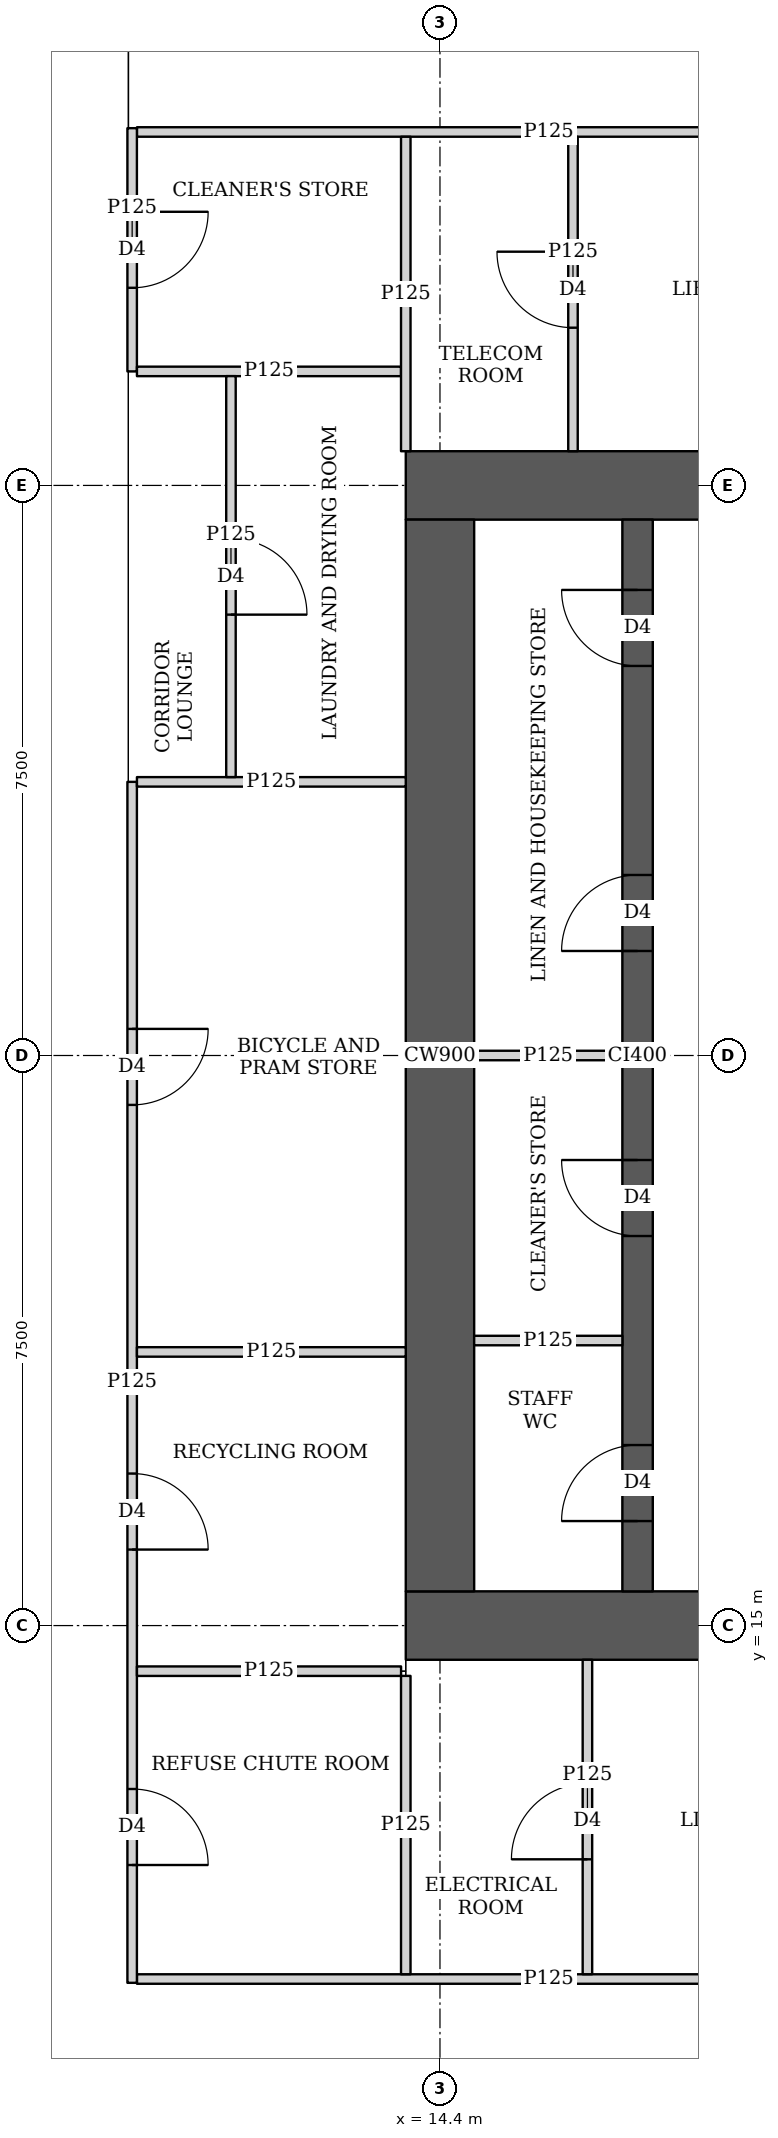
"""IFC4 building model, lengths in metres.
Left out: names, types, materials, properties, quantities, classifications, styles, units other than length and angle.
Written with IfcOpenShell. Run it as: python <this file> out.ifc"""

import sys

from ifc_helpers import new_model, si_unit, direction, frame, frame_2d, origin, place, context, subcontext, project, spatial, rectangle, extrude, element, fill, save


model = new_model("IFC4")
c1 = context("Model", 3, precision=1e-05, world=origin(), true_north=direction((0.0, 1.0)))
c2 = subcontext(c1, "Body", "Model", "MODEL_VIEW")
j1 = project(units=[si_unit("LENGTHUNIT", "METRE"), si_unit("PLANEANGLEUNIT", "RADIAN")], contexts=[c1])
p1 = place(None, origin())
s1 = spatial("IfcSite", under=j1, at=p1, CompositionType="ELEMENT")
p2 = place(p1, origin())
s2 = spatial("IfcBuilding", under=s1, at=p2, CompositionType="ELEMENT")
p3 = place(p2, frame((0.0, 0.0, 135.8)))
s3 = spatial("IfcBuildingStorey", under=s2, at=p3, CompositionType="ELEMENT", Elevation=135.8)
p4 = place(p3, frame((13.95, 15.0, 0.0), z_axis=(0.0, 0.0, 1.0), x_axis=(1.0, 0.0, 0.0)))
e1 = element("IfcWall", 1, at=p4, inside=s3, PredefinedType="SHEAR", context=c2, shape_type="SweptSolid", body=[
    extrude(rectangle(XDim=15.3, YDim=0.9, at=frame_2d((7.65, 0.0))), origin(), (0.0, 0.0, 1.0), 3.75),
])
p5 = place(p4, frame((4.45, 0.0, 0.0)))
e2 = element("IfcOpeningElement", 2, at=p5, cuts=e1, PredefinedType="OPENING", context=c2, shape_type="SweptSolid", body=[
    extrude(rectangle(XDim=1.8, YDim=2.1, at=frame_2d((0.9, 1.05))), frame((0.0, 0.46, 0.0), z_axis=(0.0, -1.0, 0.0), x_axis=(1.0, 0.0, 0.0)), (0.0, 0.0, 1.0), 0.92),
])
p6 = place(p4, frame((10.7, 0.0, 0.0)))
e3 = element("IfcOpeningElement", 3, at=p6, cuts=e1, PredefinedType="OPENING", context=c2, shape_type="SweptSolid", body=[
    extrude(rectangle(XDim=1.1, YDim=2.1, at=frame_2d((0.55, 1.05))), frame((0.0, 0.46, 0.0), z_axis=(0.0, -1.0, 0.0), x_axis=(1.0, 0.0, 0.0)), (0.0, 0.0, 1.0), 0.92),
])
p7 = place(p3, frame((13.95, 30.0, 0.0), z_axis=(0.0, 0.0, 1.0), x_axis=(1.0, 0.0, 0.0)))
e4 = element("IfcWall", 4, at=p7, inside=s3, PredefinedType="SHEAR", context=c2, shape_type="SweptSolid", body=[
    extrude(rectangle(XDim=15.3, YDim=0.9, at=frame_2d((7.65, 0.0))), origin(), (0.0, 0.0, 1.0), 3.75),
])
p8 = place(p7, frame((4.45, 0.0, 0.0)))
e5 = element("IfcOpeningElement", 5, at=p8, cuts=e4, PredefinedType="OPENING", context=c2, shape_type="SweptSolid", body=[
    extrude(rectangle(XDim=1.8, YDim=2.1, at=frame_2d((0.9, 1.05))), frame((0.0, 0.46, 0.0), z_axis=(0.0, -1.0, 0.0), x_axis=(1.0, 0.0, 0.0)), (0.0, 0.0, 1.0), 0.92),
])
p9 = place(p7, frame((10.7, 0.0, 0.0)))
e6 = element("IfcOpeningElement", 6, at=p9, cuts=e4, PredefinedType="OPENING", context=c2, shape_type="SweptSolid", body=[
    extrude(rectangle(XDim=1.1, YDim=2.1, at=frame_2d((0.55, 1.05))), frame((0.0, 0.46, 0.0), z_axis=(0.0, -1.0, 0.0), x_axis=(1.0, 0.0, 0.0)), (0.0, 0.0, 1.0), 0.92),
])
p10 = place(p3, frame((14.4, 15.45, 0.0), z_axis=(0.0, 0.0, 1.0), x_axis=(0.0, 1.0, 0.0)))
e7 = element("IfcWall", 7, at=p10, inside=s3, PredefinedType="SHEAR", context=c2, shape_type="SweptSolid", body=[
    extrude(rectangle(XDim=14.1, YDim=0.9, at=frame_2d((7.05, 0.0))), origin(), (0.0, 0.0, 1.0), 3.75),
])
p11 = place(p3, frame((17.0, 15.45, 0.0), z_axis=(0.0, 0.0, 1.0), x_axis=(0.0, 1.0, 0.0)))
e8 = element("IfcWall", 8, at=p11, inside=s3, PredefinedType="SHEAR", context=c2, shape_type="SweptSolid", body=[
    extrude(rectangle(XDim=14.1, YDim=0.4, at=frame_2d((7.05, 0.0))), origin(), (0.0, 0.0, 1.0), 3.75),
])
p12 = place(p11, frame((0.925, 0.0, 0.0)))
e9 = element("IfcOpeningElement", 9, at=p12, cuts=e8, PredefinedType="OPENING", context=c2, shape_type="SweptSolid", body=[
    extrude(rectangle(XDim=1.0, YDim=2.1, at=frame_2d((0.5, 1.05))), frame((0.0, 0.21, 0.0), z_axis=(0.0, -1.0, 0.0), x_axis=(1.0, 0.0, 0.0)), (0.0, 0.0, 1.0), 0.42),
])
p13 = place(p11, frame((4.675, 0.0, 0.0)))
e10 = element("IfcOpeningElement", 10, at=p13, cuts=e8, PredefinedType="OPENING", context=c2, shape_type="SweptSolid", body=[
    extrude(rectangle(XDim=1.0, YDim=2.1, at=frame_2d((0.5, 1.05))), frame((0.0, 0.21, 0.0), z_axis=(0.0, -1.0, 0.0), x_axis=(1.0, 0.0, 0.0)), (0.0, 0.0, 1.0), 0.42),
])
p14 = place(p11, frame((8.425, 0.0, 0.0)))
e11 = element("IfcOpeningElement", 11, at=p14, cuts=e8, PredefinedType="OPENING", context=c2, shape_type="SweptSolid", body=[
    extrude(rectangle(XDim=1.0, YDim=2.1, at=frame_2d((0.5, 1.05))), frame((0.0, 0.21, 0.0), z_axis=(0.0, -1.0, 0.0), x_axis=(1.0, 0.0, 0.0)), (0.0, 0.0, 1.0), 0.42),
])
p15 = place(p11, frame((12.175, 0.0, 0.0)))
e12 = element("IfcOpeningElement", 12, at=p15, cuts=e8, PredefinedType="OPENING", context=c2, shape_type="SweptSolid", body=[
    extrude(rectangle(XDim=1.0, YDim=2.1, at=frame_2d((0.5, 1.05))), frame((0.0, 0.21, 0.0), z_axis=(0.0, -1.0, 0.0), x_axis=(1.0, 0.0, 0.0)), (0.0, 0.0, 1.0), 0.42),
])
p16 = place(p3, frame((10.35, 10.3, 0.0), z_axis=(0.0, 0.0, 1.0), x_axis=(0.0, 1.0, 0.0)))
e13 = element("IfcWall", 13, at=p16, inside=s3, PredefinedType="PARTITIONING", context=c2, shape_type="SweptSolid", body=[
    extrude(rectangle(XDim=15.8, YDim=0.125, at=frame_2d((7.9, 0.0))), origin(), (0.0, 0.0, 1.0), 3.5),
])
p17 = place(p16, frame((1.55, 0.0, 0.0)))
e14 = element("IfcOpeningElement", 14, at=p17, cuts=e13, PredefinedType="OPENING", context=c2, shape_type="SweptSolid", body=[
    extrude(rectangle(XDim=1.0, YDim=2.1, at=frame_2d((0.5, 1.05))), frame((0.0, 0.073, 0.0), z_axis=(0.0, -1.0, 0.0), x_axis=(1.0, 0.0, 0.0)), (0.0, 0.0, 1.0), 0.145),
])
p18 = place(p16, frame((5.7, 0.0, 0.0)))
e15 = element("IfcOpeningElement", 15, at=p18, cuts=e13, PredefinedType="OPENING", context=c2, shape_type="SweptSolid", body=[
    extrude(rectangle(XDim=1.0, YDim=2.1, at=frame_2d((0.5, 1.05))), frame((0.0, 0.073, 0.0), z_axis=(0.0, -1.0, 0.0), x_axis=(1.0, 0.0, 0.0)), (0.0, 0.0, 1.0), 0.145),
])
p19 = place(p16, frame((11.55, 0.0, 0.0)))
e16 = element("IfcOpeningElement", 16, at=p19, cuts=e13, PredefinedType="OPENING", context=c2, shape_type="SweptSolid", body=[
    extrude(rectangle(XDim=1.0, YDim=2.1, at=frame_2d((0.5, 1.05))), frame((0.0, 0.073, 0.0), z_axis=(0.0, -1.0, 0.0), x_axis=(1.0, 0.0, 0.0)), (0.0, 0.0, 1.0), 0.145),
])
p20 = place(p3, frame((10.35, 31.5, 0.0), z_axis=(0.0, 0.0, 1.0), x_axis=(0.0, 1.0, 0.0)))
e17 = element("IfcWall", 17, at=p20, inside=s3, PredefinedType="PARTITIONING", context=c2, shape_type="SweptSolid", body=[
    extrude(rectangle(XDim=3.2, YDim=0.125, at=frame_2d((1.6, 0.0))), origin(), (0.0, 0.0, 1.0), 3.5),
])
p21 = place(p20, frame((1.1, 0.0, 0.0)))
e18 = element("IfcOpeningElement", 18, at=p21, cuts=e17, PredefinedType="OPENING", context=c2, shape_type="SweptSolid", body=[
    extrude(rectangle(XDim=1.0, YDim=2.1, at=frame_2d((0.5, 1.05))), frame((0.0, 0.073, 0.0), z_axis=(0.0, -1.0, 0.0), x_axis=(1.0, 0.0, 0.0)), (0.0, 0.0, 1.0), 0.145),
])
p22 = place(p3, frame((11.65, 26.163, 0.0), z_axis=(0.0, 0.0, 1.0), x_axis=(0.0, 1.0, 0.0)))
e19 = element("IfcWall", 19, at=p22, inside=s3, PredefinedType="PARTITIONING", context=c2, shape_type="SweptSolid", body=[
    extrude(rectangle(XDim=5.275, YDim=0.125, at=frame_2d((2.637, 0.0))), origin(), (0.0, 0.0, 1.0), 3.5),
])
p23 = place(p22, frame((2.137, 0.0, 0.0)))
e20 = element("IfcOpeningElement", 20, at=p23, cuts=e19, PredefinedType="OPENING", context=c2, shape_type="SweptSolid", body=[
    extrude(rectangle(XDim=1.0, YDim=2.1, at=frame_2d((0.5, 1.05))), frame((0.0, 0.073, 0.0), z_axis=(0.0, -1.0, 0.0), x_axis=(1.0, 0.0, 0.0)), (0.0, 0.0, 1.0), 0.145),
])
p24 = place(p3, frame((10.413, 14.4, 0.0), z_axis=(0.0, 0.0, 1.0), x_axis=(1.0, 0.0, 0.0)))
e21 = element("IfcWall", 21, at=p24, inside=s3, PredefinedType="PARTITIONING", context=c2, shape_type="SweptSolid", body=[
    extrude(rectangle(XDim=3.475, YDim=0.125, at=frame_2d((1.737, 0.0))), origin(), (0.0, 0.0, 1.0), 3.5),
])
for number, where, z_axis, x_axis in (
    (22, (10.413, 18.6, 0.0), (0.0, 0.0, 1.0), (1.0, 0.0, 0.0)),
    (23, (10.413, 26.1, 0.0), (0.0, 0.0, 1.0), (1.0, 0.0, 0.0)),
):
    element("IfcWall", number, at=place(p3, frame(where, z_axis=z_axis, x_axis=x_axis)), inside=s3, PredefinedType="PARTITIONING", context=c2, shape_type="SweptSolid", body=[
        extrude(rectangle(XDim=3.537, YDim=0.125, at=frame_2d((1.769, 0.0))), origin(), (0.0, 0.0, 1.0), 3.5),
    ])
p25 = place(p3, frame((10.413, 31.5, 0.0), z_axis=(0.0, 0.0, 1.0), x_axis=(1.0, 0.0, 0.0)))
e24 = element("IfcWall", 24, at=p25, inside=s3, PredefinedType="PARTITIONING", context=c2, shape_type="SweptSolid", body=[
    extrude(rectangle(XDim=3.475, YDim=0.125, at=frame_2d((1.737, 0.0))), origin(), (0.0, 0.0, 1.0), 3.5),
])
p26 = place(p3, frame((13.95, 10.413, 0.0), z_axis=(0.0, 0.0, 1.0), x_axis=(0.0, 1.0, 0.0)))
e25 = element("IfcWall", 25, at=p26, inside=s3, PredefinedType="PARTITIONING", context=c2, shape_type="SweptSolid", body=[
    extrude(rectangle(XDim=3.925, YDim=0.125, at=frame_2d((1.962, 0.0))), origin(), (0.0, 0.0, 1.0), 3.5),
])
p27 = place(p3, frame((13.95, 30.45, 0.0), z_axis=(0.0, 0.0, 1.0), x_axis=(0.0, 1.0, 0.0)))
e26 = element("IfcWall", 26, at=p27, inside=s3, PredefinedType="PARTITIONING", context=c2, shape_type="SweptSolid", body=[
    extrude(rectangle(XDim=4.137, YDim=0.125, at=frame_2d((2.068, 0.0))), origin(), (0.0, 0.0, 1.0), 3.5),
])
p28 = place(p3, frame((10.413, 10.35, 0.0), z_axis=(0.0, 0.0, 1.0), x_axis=(1.0, 0.0, 0.0)))
e27 = element("IfcWall", 27, at=p28, inside=s3, PredefinedType="PARTITIONING", context=c2, shape_type="SweptSolid", body=[
    extrude(rectangle(XDim=10.837, YDim=0.125, at=frame_2d((5.418, 0.0))), origin(), (0.0, 0.0, 1.0), 3.5),
])
p29 = place(p28, frame((7.582, 0.0, 0.0)))
e28 = element("IfcOpeningElement", 28, at=p29, cuts=e27, PredefinedType="OPENING", context=c2, shape_type="SweptSolid", body=[
    extrude(rectangle(XDim=1.8, YDim=2.1, at=frame_2d((0.9, 1.05))), frame((0.0, 0.073, 0.0), z_axis=(0.0, -1.0, 0.0), x_axis=(1.0, 0.0, 0.0)), (0.0, 0.0, 1.0), 0.145),
])
p30 = place(p3, frame((10.413, 34.65, 0.0), z_axis=(0.0, 0.0, 1.0), x_axis=(1.0, 0.0, 0.0)))
e29 = element("IfcWall", 29, at=p30, inside=s3, PredefinedType="PARTITIONING", context=c2, shape_type="SweptSolid", body=[
    extrude(rectangle(XDim=10.837, YDim=0.125, at=frame_2d((5.418, 0.0))), origin(), (0.0, 0.0, 1.0), 3.5),
])
p31 = place(p30, frame((7.487, 0.0, 0.0)))
e30 = element("IfcOpeningElement", 30, at=p31, cuts=e29, PredefinedType="OPENING", context=c2, shape_type="SweptSolid", body=[
    extrude(rectangle(XDim=1.8, YDim=2.1, at=frame_2d((0.9, 1.05))), frame((0.0, 0.073, 0.0), z_axis=(0.0, -1.0, 0.0), x_axis=(1.0, 0.0, 0.0)), (0.0, 0.0, 1.0), 0.145),
])
p32 = place(p3, frame((16.34, 10.413, 0.0), z_axis=(0.0, 0.0, 1.0), x_axis=(0.0, 1.0, 0.0)))
e31 = element("IfcWall", 31, at=p32, inside=s3, PredefinedType="PARTITIONING", context=c2, shape_type="SweptSolid", body=[
    extrude(rectangle(XDim=4.137, YDim=0.125, at=frame_2d((2.068, 0.0))), origin(), (0.0, 0.0, 1.0), 3.5),
])
p33 = place(p32, frame((1.512, 0.0, 0.0)))
e32 = element("IfcOpeningElement", 32, at=p33, cuts=e31, PredefinedType="OPENING", context=c2, shape_type="SweptSolid", body=[
    extrude(rectangle(XDim=1.0, YDim=2.1, at=frame_2d((0.5, 1.05))), frame((0.0, 0.073, 0.0), z_axis=(0.0, -1.0, 0.0), x_axis=(1.0, 0.0, 0.0)), (0.0, 0.0, 1.0), 0.145),
])
p34 = place(p3, frame((16.15, 30.45, 0.0), z_axis=(0.0, 0.0, 1.0), x_axis=(0.0, 1.0, 0.0)))
e33 = element("IfcWall", 33, at=p34, inside=s3, PredefinedType="PARTITIONING", context=c2, shape_type="SweptSolid", body=[
    extrude(rectangle(XDim=4.137, YDim=0.125, at=frame_2d((2.068, 0.0))), origin(), (0.0, 0.0, 1.0), 3.5),
])
p35 = place(p34, frame((1.625, 0.0, 0.0)))
e34 = element("IfcOpeningElement", 34, at=p35, cuts=e33, PredefinedType="OPENING", context=c2, shape_type="SweptSolid", body=[
    extrude(rectangle(XDim=1.0, YDim=2.1, at=frame_2d((0.5, 1.05))), frame((0.0, 0.073, 0.0), z_axis=(0.0, -1.0, 0.0), x_axis=(1.0, 0.0, 0.0)), (0.0, 0.0, 1.0), 0.145),
])
for number, where, z_axis, x_axis in (
    (35, (14.85, 18.75, 0.0), (0.0, 0.0, 1.0), (1.0, 0.0, 0.0)),
    (36, (14.85, 22.5, 0.0), (0.0, 0.0, 1.0), (1.0, 0.0, 0.0)),
):
    element("IfcWall", number, at=place(p3, frame(where, z_axis=z_axis, x_axis=x_axis)), inside=s3, PredefinedType="PARTITIONING", context=c2, shape_type="SweptSolid", body=[
        extrude(rectangle(XDim=1.95, YDim=0.125, at=frame_2d((0.975, 0.0))), origin(), (0.0, 0.0, 1.0), 3.5),
    ])
p36 = place(p17, origin())
e37 = element("IfcDoor", 37, at=p36, inside=s3, OperationType="SINGLE_SWING_RIGHT", PredefinedType="DOOR", context=c2, shape_type="SweptSolid", body=[
    extrude(rectangle(XDim=1.0, YDim=2.1, at=frame_2d((0.5, 1.05))), frame((0.0, 0.025, 0.0), z_axis=(0.0, -1.0, 0.0), x_axis=(1.0, 0.0, 0.0)), (0.0, 0.0, 1.0), 0.05),
])
fill(e14, e37)
p37 = place(p18, origin())
e38 = element("IfcDoor", 38, at=p37, inside=s3, OperationType="SINGLE_SWING_RIGHT", PredefinedType="DOOR", context=c2, shape_type="SweptSolid", body=[
    extrude(rectangle(XDim=1.0, YDim=2.1, at=frame_2d((0.5, 1.05))), frame((0.0, 0.025, 0.0), z_axis=(0.0, -1.0, 0.0), x_axis=(1.0, 0.0, 0.0)), (0.0, 0.0, 1.0), 0.05),
])
fill(e15, e38)
p38 = place(p19, origin())
e39 = element("IfcDoor", 39, at=p38, inside=s3, OperationType="SINGLE_SWING_LEFT", PredefinedType="DOOR", context=c2, shape_type="SweptSolid", body=[
    extrude(rectangle(XDim=1.0, YDim=2.1, at=frame_2d((0.5, 1.05))), frame((0.0, 0.025, 0.0), z_axis=(0.0, -1.0, 0.0), x_axis=(1.0, 0.0, 0.0)), (0.0, 0.0, 1.0), 0.05),
])
fill(e16, e39)
p39 = place(p23, origin())
e40 = element("IfcDoor", 40, at=p39, inside=s3, OperationType="SINGLE_SWING_RIGHT", PredefinedType="DOOR", context=c2, shape_type="SweptSolid", body=[
    extrude(rectangle(XDim=1.0, YDim=2.1, at=frame_2d((0.5, 1.05))), frame((0.0, 0.025, 0.0), z_axis=(0.0, -1.0, 0.0), x_axis=(1.0, 0.0, 0.0)), (0.0, 0.0, 1.0), 0.05),
])
fill(e20, e40)
p40 = place(p21, origin())
e41 = element("IfcDoor", 41, at=p40, inside=s3, OperationType="SINGLE_SWING_LEFT", PredefinedType="DOOR", context=c2, shape_type="SweptSolid", body=[
    extrude(rectangle(XDim=1.0, YDim=2.1, at=frame_2d((0.5, 1.05))), frame((0.0, 0.025, 0.0), z_axis=(0.0, -1.0, 0.0), x_axis=(1.0, 0.0, 0.0)), (0.0, 0.0, 1.0), 0.05),
])
fill(e18, e41)
p41 = place(p33, origin())
e42 = element("IfcDoor", 42, at=p41, inside=s3, OperationType="SINGLE_SWING_LEFT", PredefinedType="DOOR", context=c2, shape_type="SweptSolid", body=[
    extrude(rectangle(XDim=1.0, YDim=2.1, at=frame_2d((0.5, 1.05))), frame((0.0, 0.025, 0.0), z_axis=(0.0, -1.0, 0.0), x_axis=(1.0, 0.0, 0.0)), (0.0, 0.0, 1.0), 0.05),
])
fill(e32, e42)
p42 = place(p35, origin())
e43 = element("IfcDoor", 43, at=p42, inside=s3, OperationType="SINGLE_SWING_RIGHT", PredefinedType="DOOR", context=c2, shape_type="SweptSolid", body=[
    extrude(rectangle(XDim=1.0, YDim=2.1, at=frame_2d((0.5, 1.05))), frame((0.0, 0.025, 0.0), z_axis=(0.0, -1.0, 0.0), x_axis=(1.0, 0.0, 0.0)), (0.0, 0.0, 1.0), 0.05),
])
fill(e34, e43)
p43 = place(p12, origin())
e44 = element("IfcDoor", 44, at=p43, inside=s3, OperationType="SINGLE_SWING_LEFT", PredefinedType="DOOR", context=c2, shape_type="SweptSolid", body=[
    extrude(rectangle(XDim=1.0, YDim=2.1, at=frame_2d((0.5, 1.05))), frame((0.0, 0.025, 0.0), z_axis=(0.0, -1.0, 0.0), x_axis=(1.0, 0.0, 0.0)), (0.0, 0.0, 1.0), 0.05),
])
fill(e9, e44)
p44 = place(p13, origin())
e45 = element("IfcDoor", 45, at=p44, inside=s3, OperationType="SINGLE_SWING_RIGHT", PredefinedType="DOOR", context=c2, shape_type="SweptSolid", body=[
    extrude(rectangle(XDim=1.0, YDim=2.1, at=frame_2d((0.5, 1.05))), frame((0.0, 0.025, 0.0), z_axis=(0.0, -1.0, 0.0), x_axis=(1.0, 0.0, 0.0)), (0.0, 0.0, 1.0), 0.05),
])
fill(e10, e45)
p45 = place(p14, origin())
e46 = element("IfcDoor", 46, at=p45, inside=s3, OperationType="SINGLE_SWING_LEFT", PredefinedType="DOOR", context=c2, shape_type="SweptSolid", body=[
    extrude(rectangle(XDim=1.0, YDim=2.1, at=frame_2d((0.5, 1.05))), frame((0.0, 0.025, 0.0), z_axis=(0.0, -1.0, 0.0), x_axis=(1.0, 0.0, 0.0)), (0.0, 0.0, 1.0), 0.05),
])
fill(e11, e46)
p46 = place(p15, origin())
e47 = element("IfcDoor", 47, at=p46, inside=s3, OperationType="SINGLE_SWING_RIGHT", PredefinedType="DOOR", context=c2, shape_type="SweptSolid", body=[
    extrude(rectangle(XDim=1.0, YDim=2.1, at=frame_2d((0.5, 1.05))), frame((0.0, 0.025, 0.0), z_axis=(0.0, -1.0, 0.0), x_axis=(1.0, 0.0, 0.0)), (0.0, 0.0, 1.0), 0.05),
])
fill(e12, e47)
save(model, sys.argv[1])
